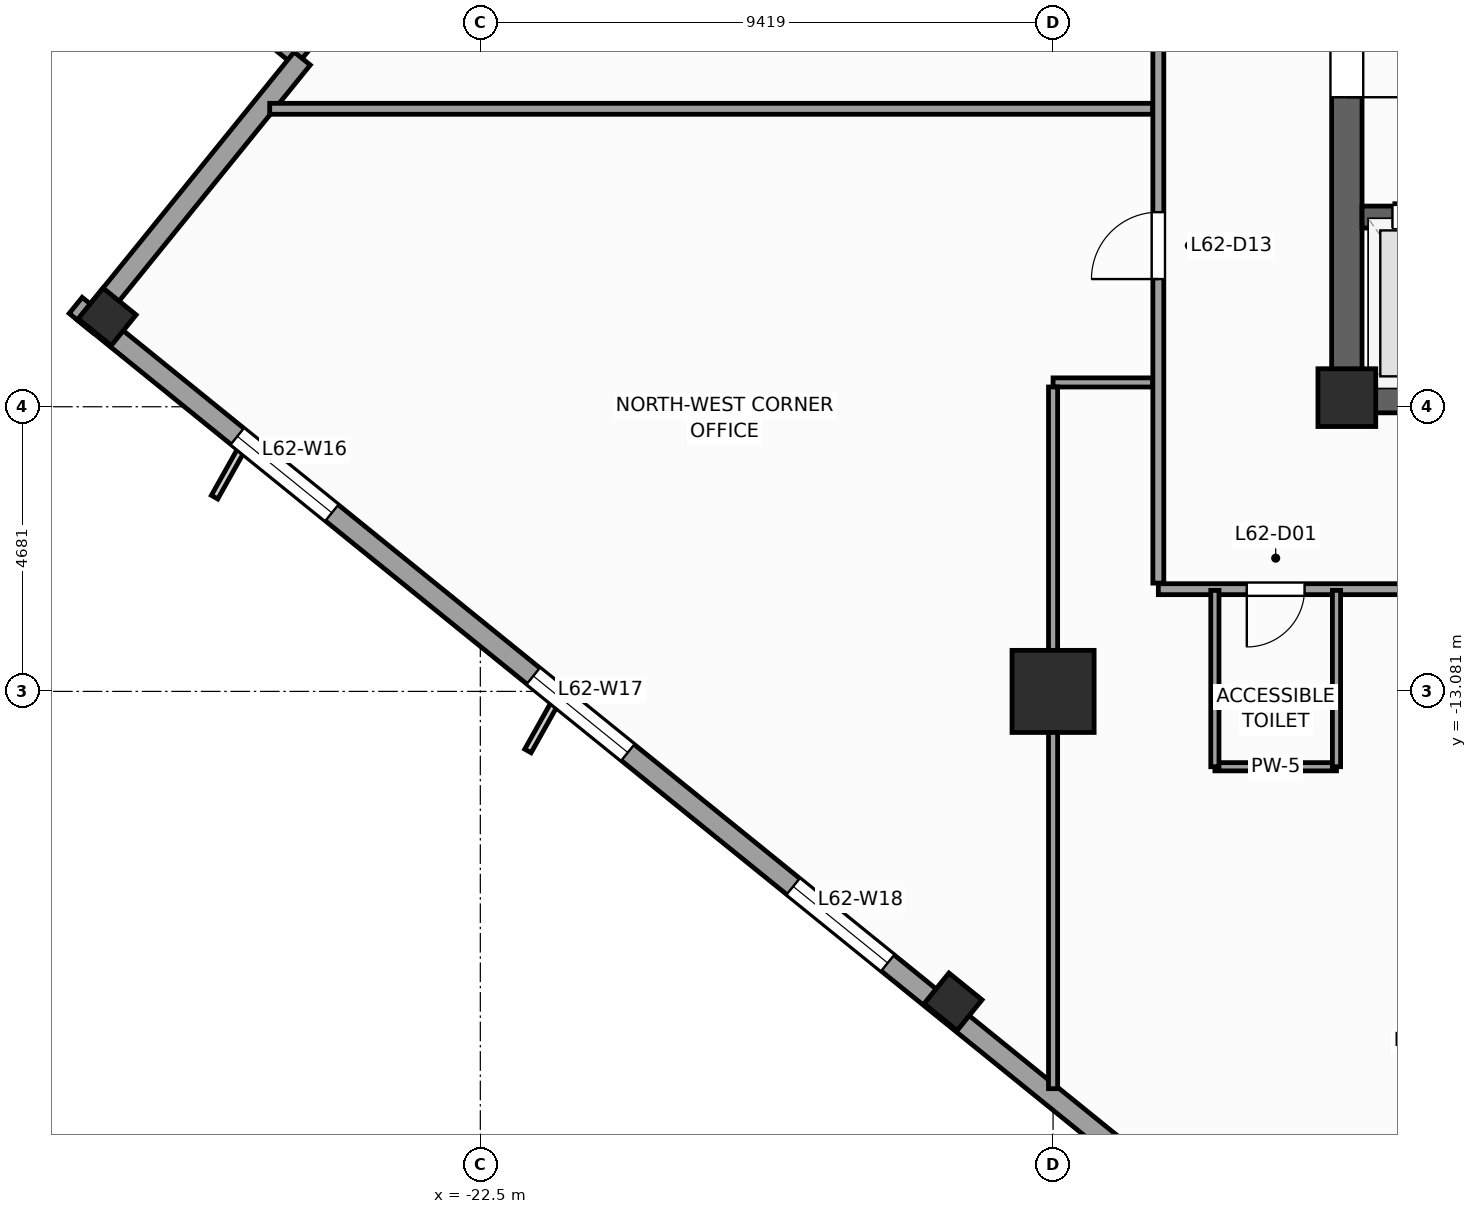
"""IFC4 building model, lengths in metres.
Left out: names, types, materials, properties, quantities, classifications, styles, units other than length and angle.
Written with IfcOpenShell. Run it as: python <this file> out.ifc"""

import sys

from ifc_helpers import new_model, si_unit, direction, frame, frame_2d, origin, origin_2d, place, context, subcontext, project, spatial, rectangle, extrude, source, transform, mapped, element, fill, save


model = new_model("IFC4")
c1 = context("Model", 3, precision=1e-05, world=origin(), true_north=direction((0.0, 1.0)))
c2 = subcontext(c1, "Body", "Model", "MODEL_VIEW")
j1 = project(units=[si_unit("LENGTHUNIT", "METRE"), si_unit("PLANEANGLEUNIT", "RADIAN")], contexts=[c1])
p1 = place(None, origin())
s1 = spatial("IfcSite", under=j1, at=p1, CompositionType="ELEMENT")
p2 = place(p1, origin())
s2 = spatial("IfcBuilding", under=s1, at=p2, CompositionType="ELEMENT")
p3 = place(p2, frame((0.0, 0.0, 256.3)))
s3 = spatial("IfcBuildingStorey", under=s2, at=p3, CompositionType="ELEMENT", Elevation=256.3)
p4 = place(p3, frame((-8.5, -8.25, 0.0), z_axis=(0.0, 0.0, 1.0), x_axis=(1.0, 0.0, 0.0)))
e1 = element("IfcWall", 1, at=p4, inside=s3, PredefinedType="SHEAR", context=c2, shape_type="SweptSolid", body=[
    extrude(rectangle(XDim=17.0, YDim=0.5, at=frame_2d((8.5, 0.0))), origin(), (0.0, 0.0, 1.0), 3.9),
])
p5 = place(p4, frame((7.85, 0.0, 0.0)))
e2 = element("IfcOpeningElement", 2, at=p5, cuts=e1, PredefinedType="OPENING", context=c2, shape_type="SweptSolid", body=[
    extrude(rectangle(XDim=1.3, YDim=2.2, at=frame_2d((0.65, 1.1))), frame((0.0, 0.26, 0.0), z_axis=(0.0, -1.0, 0.0), x_axis=(1.0, 0.0, 0.0)), (0.0, 0.0, 1.0), 0.52),
])
p6 = place(p3, frame((-8.25, -8.0, 0.0), z_axis=(0.0, 0.0, 1.0), x_axis=(0.0, 1.0, 0.0)))
e3 = element("IfcWall", 3, at=p6, inside=s3, PredefinedType="SHEAR", context=c2, shape_type="SweptSolid", body=[
    extrude(rectangle(XDim=16.0, YDim=0.5, at=frame_2d((8.0, 0.0))), origin(), (0.0, 0.0, 1.0), 3.9),
])
p7 = place(p6, frame((4.69, 0.0, 0.0)))
e4 = element("IfcOpeningElement", 4, at=p7, cuts=e3, PredefinedType="OPENING", context=c2, shape_type="SweptSolid", body=[
    extrude(rectangle(XDim=1.3, YDim=2.2, at=frame_2d((0.65, 1.1))), frame((0.0, 0.26, 0.0), z_axis=(0.0, -1.0, 0.0), x_axis=(1.0, 0.0, 0.0)), (0.0, 0.0, 1.0), 0.52),
])
p8 = place(p3, frame((-8.0, -5.28, 0.0), z_axis=(0.0, 0.0, 1.0), x_axis=(1.0, 0.0, 0.0)))
e5 = element("IfcWall", 5, at=p8, inside=s3, PredefinedType="SHEAR", context=c2, shape_type="SweptSolid", body=[
    extrude(rectangle(XDim=3.46, YDim=0.36, at=frame_2d((1.73, 0.0))), origin(), (0.0, 0.0, 1.0), 3.9),
])
p9 = place(p8, frame((0.5, 0.0, 0.0)))
e6 = element("IfcOpeningElement", 6, at=p9, cuts=e5, PredefinedType="OPENING", context=c2, shape_type="SweptSolid", body=[
    extrude(rectangle(XDim=1.2, YDim=2.25, at=frame_2d((0.6, 1.125))), frame((0.0, 0.19, 0.0), z_axis=(0.0, -1.0, 0.0), x_axis=(1.0, 0.0, 0.0)), (0.0, 0.0, 1.0), 0.38),
])
m1 = source(origin(), c2, "Body", "SweptSolid", [
    extrude(rectangle(XDim=0.95, YDim=0.95, at=origin_2d()), origin(), (0.0, 0.0, 1.0), 3.9),
])
p10 = place(p3, frame((-8.25, -8.25, 0.0), z_axis=(0.0, 0.0, 1.0), x_axis=(1.0, 0.0, 0.0)))
e7 = element("IfcColumn", 7, at=p10, inside=s3, PredefinedType="PILASTER", context=c2, shape_type="MappedRepresentation", body=[
    mapped(m1, transform((0.0, 0.0, 0.0), scale=1.0)),
])
m2 = source(origin(), c2, "Body", "SweptSolid", [
    extrude(rectangle(XDim=1.35, YDim=1.35, at=origin_2d()), origin(), (0.0, 0.0, 1.0), 3.9),
])
p11 = place(p3, frame((-13.081, -13.081, 0.0), z_axis=(0.0, 0.0, 1.0), x_axis=(1.0, 0.0, 0.0)))
e8 = element("IfcColumn", 8, at=p11, inside=s3, PredefinedType="COLUMN", context=c2, shape_type="MappedRepresentation", body=[
    mapped(m2, transform((0.0, 0.0, 0.0), scale=1.0)),
])
m3 = source(origin(), c2, "Body", "SweptSolid", [
    extrude(rectangle(XDim=0.65, YDim=0.7, at=origin_2d()), origin(), (0.0, 0.0, 1.0), 3.9),
])
for number, where, z_axis, x_axis in (
    (9, (-28.637, -6.92, 0.0), (0.0, 0.0, 1.0), (0.629, 0.777, 0.0)),
    (10, (-14.726, -18.185, 0.0), (0.0, 0.0, 1.0), (0.629, 0.777, 0.0)),
):
    element("IfcColumn", number, at=place(p3, frame(where, z_axis=z_axis, x_axis=x_axis)), inside=s3, PredefinedType="COLUMN", context=c2, shape_type="MappedRepresentation", body=[
        mapped(m3, transform((0.0, 0.0, 0.0), scale=1.0)),
    ])
p12 = place(p3, frame((-29.703, 0.789, 0.0), z_axis=(0.0, 0.0, 1.0), x_axis=(0.77714355312, -0.629323365087, 0.0)))
e11 = element("IfcWall", 11, at=p12, inside=s3, PredefinedType="STANDARD", context=c2, shape_type="SweptSolid", body=[
    extrude(rectangle(XDim=5.5, YDim=0.34, at=frame_2d((2.75, 0.0))), origin(), (0.0, 0.0, 1.0), 3.5),
])
p13 = place(p3, frame((-25.429, -2.673, 0.0), z_axis=(0.0, 0.0, 1.0), x_axis=(-0.629299794138, -0.777162640055, 0.0)))
e12 = element("IfcWall", 12, at=p13, inside=s3, PredefinedType="STANDARD", context=c2, shape_type="SweptSolid", body=[
    extrude(rectangle(XDim=5.67, YDim=0.34, at=frame_2d((2.835, 0.0))), origin(), (0.0, 0.0, 1.0), 2.02),
])
p14 = place(p3, frame((-29.154, -6.733, 0.0), z_axis=(0.0, 0.0, 1.0), x_axis=(0.77714192302, -0.629325378072, 0.0)))
e13 = element("IfcWall", 13, at=p14, inside=s3, PredefinedType="STANDARD", context=c2, shape_type="SweptSolid", body=[
    extrude(rectangle(XDim=36.84, YDim=0.34, at=frame_2d((18.42, 0.0))), origin(), (0.0, 0.0, 1.0), 2.02),
])
p15 = place(p14, frame((3.421, 0.0, 0.49)))
e14 = element("IfcOpeningElement", 14, at=p15, cuts=e13, PredefinedType="OPENING", context=c2, shape_type="SweptSolid", body=[
    extrude(rectangle(XDim=2.0, YDim=1.45, at=frame_2d((1.0, 0.725))), frame((0.0, 0.18, 0.0), z_axis=(0.0, -1.0, 0.0), x_axis=(1.0, 0.0, 0.0)), (0.0, 0.0, 1.0), 0.36),
])
p16 = place(p14, frame((9.684, 0.0, 0.49)))
e15 = element("IfcOpeningElement", 15, at=p16, cuts=e13, PredefinedType="OPENING", context=c2, shape_type="SweptSolid", body=[
    extrude(rectangle(XDim=2.0, YDim=1.45, at=frame_2d((1.0, 0.725))), frame((0.0, 0.18, 0.0), z_axis=(0.0, -1.0, 0.0), x_axis=(1.0, 0.0, 0.0)), (0.0, 0.0, 1.0), 0.36),
])
p17 = place(p14, frame((15.183, 0.0, 0.49)))
e16 = element("IfcOpeningElement", 16, at=p17, cuts=e13, PredefinedType="OPENING", context=c2, shape_type="SweptSolid", body=[
    extrude(rectangle(XDim=2.0, YDim=1.45, at=frame_2d((1.0, 0.725))), frame((0.0, 0.18, 0.0), z_axis=(0.0, -1.0, 0.0), x_axis=(1.0, 0.0, 0.0)), (0.0, 0.0, 1.0), 0.36),
])
p18 = place(p14, frame((24.051, 0.0, 0.49)))
e17 = element("IfcOpeningElement", 17, at=p18, cuts=e13, PredefinedType="OPENING", context=c2, shape_type="SweptSolid", body=[
    extrude(rectangle(XDim=2.0, YDim=1.45, at=frame_2d((1.0, 0.725))), frame((0.0, 0.18, 0.0), z_axis=(0.0, -1.0, 0.0), x_axis=(1.0, 0.0, 0.0)), (0.0, 0.0, 1.0), 0.36),
])
p19 = place(p14, frame((30.682, 0.0, 0.49)))
e18 = element("IfcOpeningElement", 18, at=p19, cuts=e13, PredefinedType="OPENING", context=c2, shape_type="SweptSolid", body=[
    extrude(rectangle(XDim=2.0, YDim=1.45, at=frame_2d((1.0, 0.725))), frame((0.0, 0.18, 0.0), z_axis=(0.0, -1.0, 0.0), x_axis=(1.0, 0.0, 0.0)), (0.0, 0.0, 1.0), 0.36),
])
p20 = place(p3, frame((-11.35, -11.4, 0.0), z_axis=(0.0, 0.0, 1.0), x_axis=(1.0, 0.0, 0.0)))
e19 = element("IfcWall", 19, at=p20, inside=s3, PredefinedType="PARTITIONING", context=c2, shape_type="SweptSolid", body=[
    extrude(rectangle(XDim=21.65, YDim=0.18, at=frame_2d((10.825, 0.0))), origin(), (0.0, 0.0, 1.0), 3.5),
])
p21 = place(p20, frame((1.455, 0.0, 0.0)))
e20 = element("IfcOpeningElement", 20, at=p21, cuts=e19, PredefinedType="OPENING", context=c2, shape_type="SweptSolid", body=[
    extrude(rectangle(XDim=0.95, YDim=2.1, at=frame_2d((0.475, 1.05))), frame((0.0, 0.1, 0.0), z_axis=(0.0, -1.0, 0.0), x_axis=(1.0, 0.0, 0.0)), (0.0, 0.0, 1.0), 0.2),
])
p22 = place(p20, frame((12.311, 0.0, 0.0)))
e21 = element("IfcOpeningElement", 21, at=p22, cuts=e19, PredefinedType="OPENING", context=c2, shape_type="SweptSolid", body=[
    extrude(rectangle(XDim=0.95, YDim=2.1, at=frame_2d((0.475, 1.05))), frame((0.0, 0.1, 0.0), z_axis=(0.0, -1.0, 0.0), x_axis=(1.0, 0.0, 0.0)), (0.0, 0.0, 1.0), 0.2),
])
p23 = place(p20, frame((17.06, 0.0, 0.0)))
e22 = element("IfcOpeningElement", 22, at=p23, cuts=e19, PredefinedType="OPENING", context=c2, shape_type="SweptSolid", body=[
    extrude(rectangle(XDim=1.1, YDim=2.2, at=frame_2d((0.55, 1.1))), frame((0.0, 0.1, 0.0), z_axis=(0.0, -1.0, 0.0), x_axis=(1.0, 0.0, 0.0)), (0.0, 0.0, 1.0), 0.2),
])
p24 = place(p20, frame((6.584, 0.0, 0.0)))
e23 = element("IfcOpeningElement", 23, at=p24, cuts=e19, PredefinedType="OPENING", context=c2, shape_type="SweptSolid", body=[
    extrude(rectangle(XDim=1.1, YDim=2.2, at=frame_2d((0.55, 1.1))), frame((0.0, 0.1, 0.0), z_axis=(0.0, -1.0, 0.0), x_axis=(1.0, 0.0, 0.0)), (0.0, 0.0, 1.0), 0.2),
])
p25 = place(p3, frame((-11.35, -11.3, 0.0), z_axis=(0.0, 0.0, 1.0), x_axis=(0.0, 1.0, 0.0)))
e24 = element("IfcWall", 24, at=p25, inside=s3, PredefinedType="PARTITIONING", context=c2, shape_type="SweptSolid", body=[
    extrude(rectangle(XDim=23.65, YDim=0.18, at=frame_2d((11.825, 0.0))), origin(), (0.0, 0.0, 1.0), 3.5),
])
p26 = place(p25, frame((13.1, 0.0, 0.0)))
e25 = element("IfcOpeningElement", 25, at=p26, cuts=e24, PredefinedType="OPENING", context=c2, shape_type="SweptSolid", body=[
    extrude(rectangle(XDim=1.1, YDim=2.2, at=frame_2d((0.55, 1.1))), frame((0.0, 0.1, 0.0), z_axis=(0.0, -1.0, 0.0), x_axis=(1.0, 0.0, 0.0)), (0.0, 0.0, 1.0), 0.2),
])
p27 = place(p25, frame((16.85, 0.0, 0.0)))
e26 = element("IfcOpeningElement", 26, at=p27, cuts=e24, PredefinedType="OPENING", context=c2, shape_type="SweptSolid", body=[
    extrude(rectangle(XDim=1.1, YDim=2.2, at=frame_2d((0.55, 1.1))), frame((0.0, 0.1, 0.0), z_axis=(0.0, -1.0, 0.0), x_axis=(1.0, 0.0, 0.0)), (0.0, 0.0, 1.0), 0.2),
])
p28 = place(p25, frame((5.0, 0.0, 0.0)))
e27 = element("IfcOpeningElement", 27, at=p28, cuts=e24, PredefinedType="OPENING", context=c2, shape_type="SweptSolid", body=[
    extrude(rectangle(XDim=1.1, YDim=2.2, at=frame_2d((0.55, 1.1))), frame((0.0, 0.1, 0.0), z_axis=(0.0, -1.0, 0.0), x_axis=(1.0, 0.0, 0.0)), (0.0, 0.0, 1.0), 0.2),
])
p29 = place(p25, frame((9.25, 0.0, 0.0)))
e28 = element("IfcOpeningElement", 28, at=p29, cuts=e24, PredefinedType="OPENING", context=c2, shape_type="SweptSolid", body=[
    extrude(rectangle(XDim=1.1, YDim=2.2, at=frame_2d((0.55, 1.1))), frame((0.0, 0.1, 0.0), z_axis=(0.0, -1.0, 0.0), x_axis=(1.0, 0.0, 0.0)), (0.0, 0.0, 1.0), 0.2),
])
p30 = place(p3, frame((-11.445, -3.5, 0.0), z_axis=(0.0, 0.0, 1.0), x_axis=(-1.0, 0.0, 0.0)))
e29 = element("IfcWall", 29, at=p30, inside=s3, PredefinedType="PARTITIONING", context=c2, shape_type="SweptSolid", body=[
    extrude(rectangle(XDim=14.519, YDim=0.18, at=frame_2d((7.259, 0.0))), origin(), (0.0, 0.0, 1.0), 3.5),
])
p31 = place(p3, frame((-11.445, -8.0, 0.0), z_axis=(0.0, 0.0, 1.0), x_axis=(-1.0, 0.0, 0.0)))
e30 = element("IfcWall", 30, at=p31, inside=s3, PredefinedType="PARTITIONING", context=c2, shape_type="SweptSolid", body=[
    extrude(rectangle(XDim=1.636, YDim=0.15, at=frame_2d((0.818, 0.0))), origin(), (0.0, 0.0, 1.0), 3.5),
])
p32 = place(p3, frame((-13.081, -8.075, 0.0), z_axis=(0.0, 0.0, 1.0), x_axis=(0.0, -1.0, 0.0)))
e31 = element("IfcWall", 31, at=p32, inside=s3, PredefinedType="PARTITIONING", context=c2, shape_type="SweptSolid", body=[
    extrude(rectangle(XDim=11.539, YDim=0.15, at=frame_2d((5.77, 0.0))), origin(), (0.0, 0.0, 1.0), 2.05),
])
p33 = place(p3, frame((-10.42, -14.32, 0.0), z_axis=(0.0, 0.0, 1.0), x_axis=(1.0, 0.0, 0.0)))
e32 = element("IfcWall", 32, at=p33, inside=s3, PredefinedType="PARTITIONING", context=c2, shape_type="SweptSolid", body=[
    extrude(rectangle(XDim=2.0, YDim=0.135, at=frame_2d((1.0, 0.0))), origin(), (0.0, 0.0, 1.0), 3.5),
])
for number, where, z_axis, x_axis in (
    (33, (-8.42, -14.32, 0.0), (0.0, 0.0, 1.0), (0.0, 1.0, 0.0)),
    (34, (-10.42, -14.32, 0.0), (0.0, 0.0, 1.0), (0.0, 1.0, 0.0)),
):
    element("IfcWall", number, at=place(p3, frame(where, z_axis=z_axis, x_axis=x_axis)), inside=s3, PredefinedType="PARTITIONING", context=c2, shape_type="SweptSolid", body=[
        extrude(rectangle(XDim=2.9, YDim=0.135, at=frame_2d((1.45, 0.0))), origin(), (0.0, 0.0, 1.0), 3.5),
    ])
m4 = source(origin(), c2, "Body", "SweptSolid", [
    extrude(rectangle(XDim=2.0, YDim=1.45, at=frame_2d((1.0, 0.725))), frame((0.0, 0.03, 0.0), z_axis=(0.0, -1.0, 0.0), x_axis=(1.0, 0.0, 0.0)), (0.0, 0.0, 1.0), 0.06),
])
p34 = place(p15, origin())
e35 = element("IfcWindow", 35, at=p34, inside=s3, PartitioningType="SINGLE_PANEL", PredefinedType="WINDOW", context=c2, shape_type="MappedRepresentation", body=[
    mapped(m4, transform((0.0, 0.0, 0.0), scale=1.0)),
])
fill(e14, e35)
p35 = place(p16, origin())
e36 = element("IfcWindow", 36, at=p35, inside=s3, PartitioningType="SINGLE_PANEL", PredefinedType="WINDOW", context=c2, shape_type="MappedRepresentation", body=[
    mapped(m4, transform((0.0, 0.0, 0.0), scale=1.0)),
])
fill(e15, e36)
p36 = place(p17, origin())
e37 = element("IfcWindow", 37, at=p36, inside=s3, PartitioningType="SINGLE_PANEL", PredefinedType="WINDOW", context=c2, shape_type="MappedRepresentation", body=[
    mapped(m4, transform((0.0, 0.0, 0.0), scale=1.0)),
])
fill(e16, e37)
m5 = source(origin(), c2, "Body", "SweptSolid", [
    extrude(rectangle(XDim=1.3, YDim=2.2, at=frame_2d((0.65, 1.1))), frame((0.0, 0.025, 0.0), z_axis=(0.0, -1.0, 0.0), x_axis=(1.0, 0.0, 0.0)), (0.0, 0.0, 1.0), 0.05),
])
p37 = place(p7, frame((1.3, 0.0, 0.0), z_axis=(0.0, 0.0, 1.0), x_axis=(-1.0, 0.0, 0.0)))
e38 = element("IfcDoor", 38, at=p37, inside=s3, OperationType="SINGLE_SWING_LEFT", PredefinedType="DOOR", context=c2, shape_type="MappedRepresentation", body=[
    mapped(m5, transform((0.0, 0.0, 0.0), scale=1.0)),
])
fill(e4, e38)
m6 = source(origin(), c2, "Body", "SweptSolid", [
    extrude(rectangle(XDim=1.2, YDim=2.25, at=frame_2d((0.6, 1.125))), frame((0.0, 0.025, 0.0), z_axis=(0.0, -1.0, 0.0), x_axis=(1.0, 0.0, 0.0)), (0.0, 0.0, 1.0), 0.05),
])
p38 = place(p9, origin())
e39 = element("IfcDoor", 39, at=p38, inside=s3, OperationType="DOUBLE_DOOR_SLIDING", PredefinedType="DOOR", context=c2, shape_type="MappedRepresentation", body=[
    mapped(m6, transform((0.0, 0.0, 0.0), scale=1.0)),
])
fill(e6, e39)
m7 = source(origin(), c2, "Body", "SweptSolid", [
    extrude(rectangle(XDim=0.95, YDim=2.1, at=frame_2d((0.475, 1.05))), frame((0.0, 0.025, 0.0), z_axis=(0.0, -1.0, 0.0), x_axis=(1.0, 0.0, 0.0)), (0.0, 0.0, 1.0), 0.05),
])
p39 = place(p21, frame((0.95, 0.0, 0.0), z_axis=(0.0, 0.0, 1.0), x_axis=(-1.0, 0.0, 0.0)))
e40 = element("IfcDoor", 40, at=p39, inside=s3, OperationType="SINGLE_SWING_LEFT", PredefinedType="DOOR", context=c2, shape_type="MappedRepresentation", body=[
    mapped(m7, transform((0.0, 0.0, 0.0), scale=1.0)),
])
fill(e20, e40)
m8 = source(origin(), c2, "Body", "SweptSolid", [
    extrude(rectangle(XDim=1.1, YDim=2.2, at=frame_2d((0.55, 1.1))), frame((0.0, 0.025, 0.0), z_axis=(0.0, -1.0, 0.0), x_axis=(1.0, 0.0, 0.0)), (0.0, 0.0, 1.0), 0.05),
])
p40 = place(p28, origin())
e41 = element("IfcDoor", 41, at=p40, inside=s3, OperationType="SINGLE_SWING_LEFT", PredefinedType="DOOR", context=c2, shape_type="MappedRepresentation", body=[
    mapped(m8, transform((0.0, 0.0, 0.0), scale=1.0)),
])
fill(e27, e41)
save(model, sys.argv[1])
